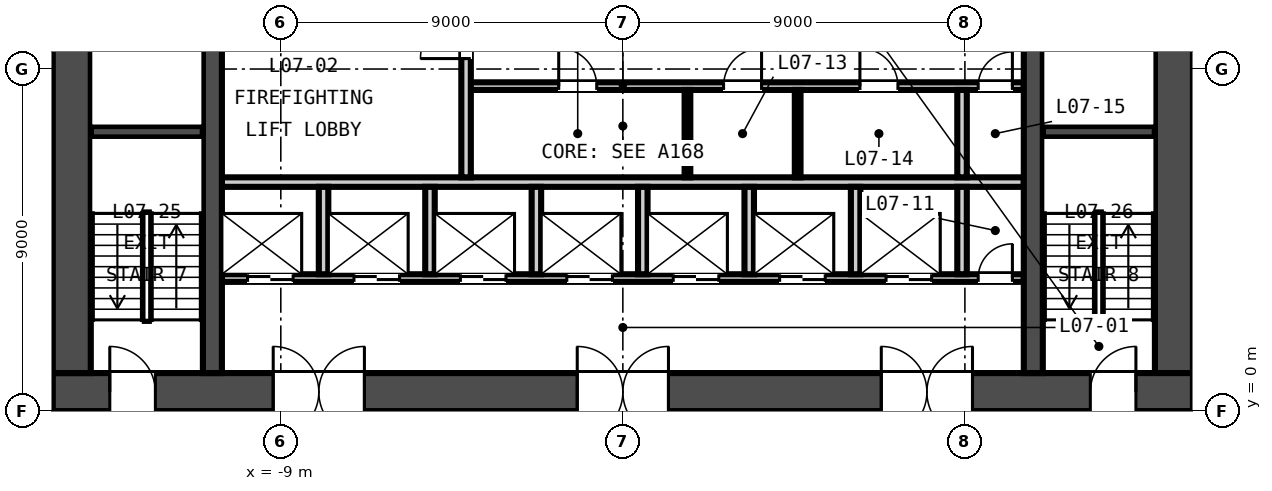
"""IFC4 building model, lengths in metres.
Left out: names, types, materials, properties, quantities, classifications, styles, units other than length and angle.
Written with IfcOpenShell. Run it as: python <this file> out.ifc"""

import sys

from ifc_helpers import new_model, si_unit, direction, frame, frame_2d, origin, place, context, subcontext, project, spatial, rectangle, extrude, element, fill, save


model = new_model("IFC4")
c1 = context("Model", 3, precision=1e-05, world=origin(), true_north=direction((0.0, 1.0)))
c2 = subcontext(c1, "Body", "Model", "MODEL_VIEW")
j1 = project(units=[si_unit("LENGTHUNIT", "METRE"), si_unit("PLANEANGLEUNIT", "RADIAN")], contexts=[c1])
p1 = place(None, origin())
s1 = spatial("IfcSite", under=j1, at=p1, CompositionType="ELEMENT")
p2 = place(p1, origin())
s2 = spatial("IfcBuilding", under=s1, at=p2, CompositionType="ELEMENT")
p3 = place(p2, frame((0.0, 0.0, 39.65)))
s3 = spatial("IfcBuildingStorey", under=s2, at=p3, CompositionType="ELEMENT", Elevation=39.65)
p4 = place(p3, frame((-15.0, 0.5, -0.15), z_axis=(0.0, 0.0, 1.0), x_axis=(1.0, 0.0, 0.0)))
e1 = element("IfcWall", 1, at=p4, inside=s3, PredefinedType="SOLIDWALL", context=c2, shape_type="SweptSolid", body=[
    extrude(rectangle(XDim=30.0, YDim=1.0, at=frame_2d((15.0, 0.0))), origin(), (0.0, 0.0, 1.0), 3.65),
])
p5 = place(p4, frame((5.8, 0.0, 0.15)))
e2 = element("IfcOpeningElement", 2, at=p5, cuts=e1, PredefinedType="OPENING", context=c2, shape_type="SweptSolid", body=[
    extrude(rectangle(XDim=2.4, YDim=2.4, at=frame_2d((1.2, 1.2))), frame((0.0, 0.51, 0.0), z_axis=(0.0, -1.0, 0.0), x_axis=(1.0, 0.0, 0.0)), (0.0, 0.0, 1.0), 1.02),
])
p6 = place(p4, frame((13.8, 0.0, 0.15)))
e3 = element("IfcOpeningElement", 3, at=p6, cuts=e1, PredefinedType="OPENING", context=c2, shape_type="SweptSolid", body=[
    extrude(rectangle(XDim=2.4, YDim=2.4, at=frame_2d((1.2, 1.2))), frame((0.0, 0.51, 0.0), z_axis=(0.0, -1.0, 0.0), x_axis=(1.0, 0.0, 0.0)), (0.0, 0.0, 1.0), 1.02),
])
p7 = place(p4, frame((21.8, 0.0, 0.15)))
e4 = element("IfcOpeningElement", 4, at=p7, cuts=e1, PredefinedType="OPENING", context=c2, shape_type="SweptSolid", body=[
    extrude(rectangle(XDim=2.4, YDim=2.4, at=frame_2d((1.2, 1.2))), frame((0.0, 0.51, 0.0), z_axis=(0.0, -1.0, 0.0), x_axis=(1.0, 0.0, 0.0)), (0.0, 0.0, 1.0), 1.02),
])
p8 = place(p4, frame((1.5, 0.0, 0.15)))
e5 = element("IfcOpeningElement", 5, at=p8, cuts=e1, PredefinedType="OPENING", context=c2, shape_type="SweptSolid", body=[
    extrude(rectangle(XDim=1.2, YDim=2.1, at=frame_2d((0.6, 1.05))), frame((0.0, 0.51, 0.0), z_axis=(0.0, -1.0, 0.0), x_axis=(1.0, 0.0, 0.0)), (0.0, 0.0, 1.0), 1.02),
])
p9 = place(p4, frame((27.3, 0.0, 0.15)))
e6 = element("IfcOpeningElement", 6, at=p9, cuts=e1, PredefinedType="OPENING", context=c2, shape_type="SweptSolid", body=[
    extrude(rectangle(XDim=1.2, YDim=2.1, at=frame_2d((0.6, 1.05))), frame((0.0, 0.51, 0.0), z_axis=(0.0, -1.0, 0.0), x_axis=(1.0, 0.0, 0.0)), (0.0, 0.0, 1.0), 1.02),
])
for number, where, z_axis, x_axis in (
    (7, (-14.5, 1.0, -0.15), (0.0, 0.0, 1.0), (0.0, 1.0, 0.0)),
    (8, (14.5, 1.0, -0.15), (0.0, 0.0, 1.0), (0.0, 1.0, 0.0)),
):
    element("IfcWall", number, at=place(p3, frame(where, z_axis=z_axis, x_axis=x_axis)), inside=s3, PredefinedType="SOLIDWALL", context=c2, shape_type="SweptSolid", body=[
        extrude(rectangle(XDim=13.0, YDim=1.0, at=frame_2d((6.5, 0.0))), origin(), (0.0, 0.0, 1.0), 3.65),
    ])
for number, where, z_axis, x_axis in (
    (9, (-10.8, 1.0, -0.15), (0.0, 0.0, 1.0), (0.0, 1.0, 0.0)),
    (10, (10.8, 1.0, -0.15), (0.0, 0.0, 1.0), (0.0, 1.0, 0.0)),
):
    element("IfcWall", number, at=place(p3, frame(where, z_axis=z_axis, x_axis=x_axis)), inside=s3, PredefinedType="SOLIDWALL", context=c2, shape_type="SweptSolid", body=[
        extrude(rectangle(XDim=13.0, YDim=0.5, at=frame_2d((6.5, 0.0))), origin(), (0.0, 0.0, 1.0), 3.65),
    ])
p10 = place(p3, frame((-10.55, 3.5, 0.0), z_axis=(0.0, 0.0, 1.0), x_axis=(1.0, 0.0, 0.0)))
e11 = element("IfcWall", 11, at=p10, inside=s3, PredefinedType="PARTITIONING", context=c2, shape_type="SweptSolid", body=[
    extrude(rectangle(XDim=21.1, YDim=0.2, at=frame_2d((10.55, 0.0))), origin(), (0.0, 0.0, 1.0), 3.5),
])
p11 = place(p10, frame((0.675, 0.0, 0.0)))
e12 = element("IfcOpeningElement", 12, at=p11, cuts=e11, PredefinedType="OPENING", context=c2, shape_type="SweptSolid", body=[
    extrude(rectangle(XDim=1.2, YDim=2.1, at=frame_2d((0.6, 1.05))), frame((0.0, 0.11, 0.0), z_axis=(0.0, -1.0, 0.0), x_axis=(1.0, 0.0, 0.0)), (0.0, 0.0, 1.0), 0.22),
])
p12 = place(p10, frame((3.475, 0.0, 0.0)))
e13 = element("IfcOpeningElement", 13, at=p12, cuts=e11, PredefinedType="OPENING", context=c2, shape_type="SweptSolid", body=[
    extrude(rectangle(XDim=1.2, YDim=2.1, at=frame_2d((0.6, 1.05))), frame((0.0, 0.11, 0.0), z_axis=(0.0, -1.0, 0.0), x_axis=(1.0, 0.0, 0.0)), (0.0, 0.0, 1.0), 0.22),
])
p13 = place(p10, frame((6.275, 0.0, 0.0)))
e14 = element("IfcOpeningElement", 14, at=p13, cuts=e11, PredefinedType="OPENING", context=c2, shape_type="SweptSolid", body=[
    extrude(rectangle(XDim=1.2, YDim=2.1, at=frame_2d((0.6, 1.05))), frame((0.0, 0.11, 0.0), z_axis=(0.0, -1.0, 0.0), x_axis=(1.0, 0.0, 0.0)), (0.0, 0.0, 1.0), 0.22),
])
p14 = place(p10, frame((9.075, 0.0, 0.0)))
e15 = element("IfcOpeningElement", 15, at=p14, cuts=e11, PredefinedType="OPENING", context=c2, shape_type="SweptSolid", body=[
    extrude(rectangle(XDim=1.2, YDim=2.1, at=frame_2d((0.6, 1.05))), frame((0.0, 0.11, 0.0), z_axis=(0.0, -1.0, 0.0), x_axis=(1.0, 0.0, 0.0)), (0.0, 0.0, 1.0), 0.22),
])
p15 = place(p10, frame((11.875, 0.0, 0.0)))
e16 = element("IfcOpeningElement", 16, at=p15, cuts=e11, PredefinedType="OPENING", context=c2, shape_type="SweptSolid", body=[
    extrude(rectangle(XDim=1.2, YDim=2.1, at=frame_2d((0.6, 1.05))), frame((0.0, 0.11, 0.0), z_axis=(0.0, -1.0, 0.0), x_axis=(1.0, 0.0, 0.0)), (0.0, 0.0, 1.0), 0.22),
])
p16 = place(p10, frame((14.675, 0.0, 0.0)))
e17 = element("IfcOpeningElement", 17, at=p16, cuts=e11, PredefinedType="OPENING", context=c2, shape_type="SweptSolid", body=[
    extrude(rectangle(XDim=1.2, YDim=2.1, at=frame_2d((0.6, 1.05))), frame((0.0, 0.11, 0.0), z_axis=(0.0, -1.0, 0.0), x_axis=(1.0, 0.0, 0.0)), (0.0, 0.0, 1.0), 0.22),
])
p17 = place(p10, frame((17.475, 0.0, 0.0)))
e18 = element("IfcOpeningElement", 18, at=p17, cuts=e11, PredefinedType="OPENING", context=c2, shape_type="SweptSolid", body=[
    extrude(rectangle(XDim=1.2, YDim=2.1, at=frame_2d((0.6, 1.05))), frame((0.0, 0.11, 0.0), z_axis=(0.0, -1.0, 0.0), x_axis=(1.0, 0.0, 0.0)), (0.0, 0.0, 1.0), 0.22),
])
p18 = place(p10, frame((19.9, 0.0, 0.0)))
e19 = element("IfcOpeningElement", 19, at=p18, cuts=e11, PredefinedType="OPENING", context=c2, shape_type="SweptSolid", body=[
    extrude(rectangle(XDim=0.9, YDim=2.1, at=frame_2d((0.45, 1.05))), frame((0.0, 0.11, 0.0), z_axis=(0.0, -1.0, 0.0), x_axis=(1.0, 0.0, 0.0)), (0.0, 0.0, 1.0), 0.22),
])
p19 = place(p3, frame((-10.55, 6.025, 0.0), z_axis=(0.0, 0.0, 1.0), x_axis=(1.0, 0.0, 0.0)))
e20 = element("IfcWall", 20, at=p19, inside=s3, PredefinedType="PARTITIONING", context=c2, shape_type="SweptSolid", body=[
    extrude(rectangle(XDim=21.1, YDim=0.25, at=frame_2d((10.55, 0.0))), origin(), (0.0, 0.0, 1.0), 3.5),
])
p20 = place(p3, frame((-4.125, 8.55, 0.0), z_axis=(0.0, 0.0, 1.0), x_axis=(1.0, 0.0, 0.0)))
e21 = element("IfcWall", 21, at=p20, inside=s3, PredefinedType="PARTITIONING", context=c2, shape_type="SweptSolid", body=[
    extrude(rectangle(XDim=14.675, YDim=0.2, at=frame_2d((7.337, 0.0))), origin(), (0.0, 0.0, 1.0), 3.5),
])
p21 = place(p20, frame((2.438, 0.0, 0.0)))
e22 = element("IfcOpeningElement", 22, at=p21, cuts=e21, PredefinedType="OPENING", context=c2, shape_type="SweptSolid", body=[
    extrude(rectangle(XDim=1.0, YDim=2.1, at=frame_2d((0.5, 1.05))), frame((0.0, 0.11, 0.0), z_axis=(0.0, -1.0, 0.0), x_axis=(1.0, 0.0, 0.0)), (0.0, 0.0, 1.0), 0.22),
])
p22 = place(p20, frame((6.775, 0.0, 0.0)))
e23 = element("IfcOpeningElement", 23, at=p22, cuts=e21, PredefinedType="OPENING", context=c2, shape_type="SweptSolid", body=[
    extrude(rectangle(XDim=1.0, YDim=2.1, at=frame_2d((0.5, 1.05))), frame((0.0, 0.11, 0.0), z_axis=(0.0, -1.0, 0.0), x_axis=(1.0, 0.0, 0.0)), (0.0, 0.0, 1.0), 0.22),
])
p23 = place(p20, frame((10.363, 0.0, 0.0)))
e24 = element("IfcOpeningElement", 24, at=p23, cuts=e21, PredefinedType="OPENING", context=c2, shape_type="SweptSolid", body=[
    extrude(rectangle(XDim=1.0, YDim=2.1, at=frame_2d((0.5, 1.05))), frame((0.0, 0.11, 0.0), z_axis=(0.0, -1.0, 0.0), x_axis=(1.0, 0.0, 0.0)), (0.0, 0.0, 1.0), 0.22),
])
p24 = place(p20, frame((13.475, 0.0, 0.0)))
e25 = element("IfcOpeningElement", 25, at=p24, cuts=e21, PredefinedType="OPENING", context=c2, shape_type="SweptSolid", body=[
    extrude(rectangle(XDim=0.9, YDim=2.1, at=frame_2d((0.45, 1.05))), frame((0.0, 0.11, 0.0), z_axis=(0.0, -1.0, 0.0), x_axis=(1.0, 0.0, 0.0)), (0.0, 0.0, 1.0), 0.22),
])
p25 = place(p3, frame((-4.125, 6.15, 0.0), z_axis=(0.0, 0.0, 1.0), x_axis=(0.0, 1.0, 0.0)))
e26 = element("IfcWall", 26, at=p25, inside=s3, PredefinedType="PARTITIONING", context=c2, shape_type="SweptSolid", body=[
    extrude(rectangle(XDim=4.95, YDim=0.25, at=frame_2d((2.475, 0.0))), origin(), (0.0, 0.0, 1.0), 3.5),
])
p26 = place(p25, frame((3.125, 0.0, 0.0)))
e27 = element("IfcOpeningElement", 27, at=p26, cuts=e26, PredefinedType="OPENING", context=c2, shape_type="SweptSolid", body=[
    extrude(rectangle(XDim=1.2, YDim=2.1, at=frame_2d((0.6, 1.05))), frame((0.0, 0.135, 0.0), z_axis=(0.0, -1.0, 0.0), x_axis=(1.0, 0.0, 0.0)), (0.0, 0.0, 1.0), 0.27),
])
for number, where, z_axis, x_axis in (
    (28, (-7.875, 3.6, 0.0), (0.0, 0.0, 1.0), (0.0, 1.0, 0.0)),
    (29, (-5.075, 3.6, 0.0), (0.0, 0.0, 1.0), (0.0, 1.0, 0.0)),
    (30, (-2.275, 3.6, 0.0), (0.0, 0.0, 1.0), (0.0, 1.0, 0.0)),
    (31, (0.525, 3.6, 0.0), (0.0, 0.0, 1.0), (0.0, 1.0, 0.0)),
    (32, (3.325, 3.6, 0.0), (0.0, 0.0, 1.0), (0.0, 1.0, 0.0)),
    (33, (6.125, 3.6, 0.0), (0.0, 0.0, 1.0), (0.0, 1.0, 0.0)),
    (34, (8.925, 3.6, 0.0), (0.0, 0.0, 1.0), (0.0, 1.0, 0.0)),
):
    element("IfcWall", number, at=place(p3, frame(where, z_axis=z_axis, x_axis=x_axis)), inside=s3, PredefinedType="PARTITIONING", context=c2, shape_type="SweptSolid", body=[
        extrude(rectangle(XDim=2.3, YDim=0.25, at=frame_2d((1.15, 0.0))), origin(), (0.0, 0.0, 1.0), 3.5),
    ])
for number, where, z_axis, x_axis in (
    (35, (1.7, 6.15, 0.0), (0.0, 0.0, 1.0), (0.0, 1.0, 0.0)),
    (36, (4.6, 6.15, 0.0), (0.0, 0.0, 1.0), (0.0, 1.0, 0.0)),
):
    element("IfcWall", number, at=place(p3, frame(where, z_axis=z_axis, x_axis=x_axis)), inside=s3, PredefinedType="PARTITIONING", context=c2, shape_type="SweptSolid", body=[
        extrude(rectangle(XDim=2.3, YDim=0.15, at=frame_2d((1.15, 0.0))), origin(), (0.0, 0.0, 1.0), 3.5),
    ])
p27 = place(p3, frame((8.925, 6.15, 0.0), z_axis=(0.0, 0.0, 1.0), x_axis=(0.0, 1.0, 0.0)))
e37 = element("IfcWall", 37, at=p27, inside=s3, PredefinedType="PARTITIONING", context=c2, shape_type="SweptSolid", body=[
    extrude(rectangle(XDim=2.3, YDim=0.25, at=frame_2d((1.15, 0.0))), origin(), (0.0, 0.0, 1.0), 3.5),
])
for number, where, z_axis, x_axis in (
    (38, (-14.0, 7.35, -0.15), (0.0, 0.0, 1.0), (1.0, 0.0, 0.0)),
    (39, (11.05, 7.35, -0.15), (0.0, 0.0, 1.0), (1.0, 0.0, 0.0)),
):
    element("IfcWall", number, at=place(p3, frame(where, z_axis=z_axis, x_axis=x_axis)), inside=s3, PredefinedType="SOLIDWALL", context=c2, shape_type="SweptSolid", body=[
        extrude(rectangle(XDim=2.95, YDim=0.3, at=frame_2d((1.475, 0.0))), origin(), (0.0, 0.0, 1.0), 3.65),
    ])
p28 = place(p26, origin())
e40 = element("IfcDoor", 40, at=p28, inside=s3, OperationType="SINGLE_SWING_LEFT", PredefinedType="DOOR", context=c2, shape_type="SweptSolid", body=[
    extrude(rectangle(XDim=1.2, YDim=2.1, at=frame_2d((0.6, 1.05))), frame((0.0, 0.025, 0.0), z_axis=(0.0, -1.0, 0.0), x_axis=(1.0, 0.0, 0.0)), (0.0, 0.0, 1.0), 0.05),
])
fill(e27, e40)
p29 = place(p11, origin())
e41 = element("IfcDoor", 41, at=p29, inside=s3, OperationType="DOUBLE_DOOR_SLIDING", PredefinedType="DOOR", context=c2, shape_type="SweptSolid", body=[
    extrude(rectangle(XDim=1.2, YDim=2.1, at=frame_2d((0.6, 1.05))), frame((0.0, 0.025, 0.0), z_axis=(0.0, -1.0, 0.0), x_axis=(1.0, 0.0, 0.0)), (0.0, 0.0, 1.0), 0.05),
])
fill(e12, e41)
p30 = place(p12, origin())
e42 = element("IfcDoor", 42, at=p30, inside=s3, OperationType="DOUBLE_DOOR_SLIDING", PredefinedType="DOOR", context=c2, shape_type="SweptSolid", body=[
    extrude(rectangle(XDim=1.2, YDim=2.1, at=frame_2d((0.6, 1.05))), frame((0.0, 0.025, 0.0), z_axis=(0.0, -1.0, 0.0), x_axis=(1.0, 0.0, 0.0)), (0.0, 0.0, 1.0), 0.05),
])
fill(e13, e42)
p31 = place(p13, origin())
e43 = element("IfcDoor", 43, at=p31, inside=s3, OperationType="DOUBLE_DOOR_SLIDING", PredefinedType="DOOR", context=c2, shape_type="SweptSolid", body=[
    extrude(rectangle(XDim=1.2, YDim=2.1, at=frame_2d((0.6, 1.05))), frame((0.0, 0.025, 0.0), z_axis=(0.0, -1.0, 0.0), x_axis=(1.0, 0.0, 0.0)), (0.0, 0.0, 1.0), 0.05),
])
fill(e14, e43)
p32 = place(p14, origin())
e44 = element("IfcDoor", 44, at=p32, inside=s3, OperationType="DOUBLE_DOOR_SLIDING", PredefinedType="DOOR", context=c2, shape_type="SweptSolid", body=[
    extrude(rectangle(XDim=1.2, YDim=2.1, at=frame_2d((0.6, 1.05))), frame((0.0, 0.025, 0.0), z_axis=(0.0, -1.0, 0.0), x_axis=(1.0, 0.0, 0.0)), (0.0, 0.0, 1.0), 0.05),
])
fill(e15, e44)
p33 = place(p15, origin())
e45 = element("IfcDoor", 45, at=p33, inside=s3, OperationType="DOUBLE_DOOR_SLIDING", PredefinedType="DOOR", context=c2, shape_type="SweptSolid", body=[
    extrude(rectangle(XDim=1.2, YDim=2.1, at=frame_2d((0.6, 1.05))), frame((0.0, 0.025, 0.0), z_axis=(0.0, -1.0, 0.0), x_axis=(1.0, 0.0, 0.0)), (0.0, 0.0, 1.0), 0.05),
])
fill(e16, e45)
p34 = place(p16, origin())
e46 = element("IfcDoor", 46, at=p34, inside=s3, OperationType="DOUBLE_DOOR_SLIDING", PredefinedType="DOOR", context=c2, shape_type="SweptSolid", body=[
    extrude(rectangle(XDim=1.2, YDim=2.1, at=frame_2d((0.6, 1.05))), frame((0.0, 0.025, 0.0), z_axis=(0.0, -1.0, 0.0), x_axis=(1.0, 0.0, 0.0)), (0.0, 0.0, 1.0), 0.05),
])
fill(e17, e46)
p35 = place(p17, origin())
e47 = element("IfcDoor", 47, at=p35, inside=s3, OperationType="DOUBLE_DOOR_SLIDING", PredefinedType="DOOR", context=c2, shape_type="SweptSolid", body=[
    extrude(rectangle(XDim=1.2, YDim=2.1, at=frame_2d((0.6, 1.05))), frame((0.0, 0.025, 0.0), z_axis=(0.0, -1.0, 0.0), x_axis=(1.0, 0.0, 0.0)), (0.0, 0.0, 1.0), 0.05),
])
fill(e18, e47)
p36 = place(p18, origin())
e48 = element("IfcDoor", 48, at=p36, inside=s3, OperationType="SINGLE_SWING_RIGHT", PredefinedType="DOOR", context=c2, shape_type="SweptSolid", body=[
    extrude(rectangle(XDim=0.9, YDim=2.1, at=frame_2d((0.45, 1.05))), frame((0.0, 0.025, 0.0), z_axis=(0.0, -1.0, 0.0), x_axis=(1.0, 0.0, 0.0)), (0.0, 0.0, 1.0), 0.05),
])
fill(e19, e48)
p37 = place(p21, origin())
e49 = element("IfcDoor", 49, at=p37, inside=s3, OperationType="SINGLE_SWING_LEFT", PredefinedType="DOOR", context=c2, shape_type="SweptSolid", body=[
    extrude(rectangle(XDim=1.0, YDim=2.1, at=frame_2d((0.5, 1.05))), frame((0.0, 0.025, 0.0), z_axis=(0.0, -1.0, 0.0), x_axis=(1.0, 0.0, 0.0)), (0.0, 0.0, 1.0), 0.05),
])
fill(e22, e49)
p38 = place(p22, origin())
e50 = element("IfcDoor", 50, at=p38, inside=s3, OperationType="SINGLE_SWING_RIGHT", PredefinedType="DOOR", context=c2, shape_type="SweptSolid", body=[
    extrude(rectangle(XDim=1.0, YDim=2.1, at=frame_2d((0.5, 1.05))), frame((0.0, 0.025, 0.0), z_axis=(0.0, -1.0, 0.0), x_axis=(1.0, 0.0, 0.0)), (0.0, 0.0, 1.0), 0.05),
])
fill(e23, e50)
p39 = place(p23, origin())
e51 = element("IfcDoor", 51, at=p39, inside=s3, OperationType="SINGLE_SWING_LEFT", PredefinedType="DOOR", context=c2, shape_type="SweptSolid", body=[
    extrude(rectangle(XDim=1.0, YDim=2.1, at=frame_2d((0.5, 1.05))), frame((0.0, 0.025, 0.0), z_axis=(0.0, -1.0, 0.0), x_axis=(1.0, 0.0, 0.0)), (0.0, 0.0, 1.0), 0.05),
])
fill(e24, e51)
p40 = place(p24, origin())
e52 = element("IfcDoor", 52, at=p40, inside=s3, OperationType="SINGLE_SWING_RIGHT", PredefinedType="DOOR", context=c2, shape_type="SweptSolid", body=[
    extrude(rectangle(XDim=0.9, YDim=2.1, at=frame_2d((0.45, 1.05))), frame((0.0, 0.025, 0.0), z_axis=(0.0, -1.0, 0.0), x_axis=(1.0, 0.0, 0.0)), (0.0, 0.0, 1.0), 0.05),
])
fill(e25, e52)
p41 = place(p5, origin())
e53 = element("IfcDoor", 53, at=p41, inside=s3, OperationType="DOUBLE_DOOR_DOUBLE_SWING", PredefinedType="DOOR", context=c2, shape_type="SweptSolid", body=[
    extrude(rectangle(XDim=2.4, YDim=2.4, at=frame_2d((1.2, 1.2))), frame((0.0, 0.025, 0.0), z_axis=(0.0, -1.0, 0.0), x_axis=(1.0, 0.0, 0.0)), (0.0, 0.0, 1.0), 0.05),
])
fill(e2, e53)
p42 = place(p6, origin())
e54 = element("IfcDoor", 54, at=p42, inside=s3, OperationType="DOUBLE_DOOR_DOUBLE_SWING", PredefinedType="DOOR", context=c2, shape_type="SweptSolid", body=[
    extrude(rectangle(XDim=2.4, YDim=2.4, at=frame_2d((1.2, 1.2))), frame((0.0, 0.025, 0.0), z_axis=(0.0, -1.0, 0.0), x_axis=(1.0, 0.0, 0.0)), (0.0, 0.0, 1.0), 0.05),
])
fill(e3, e54)
p43 = place(p7, origin())
e55 = element("IfcDoor", 55, at=p43, inside=s3, OperationType="DOUBLE_DOOR_DOUBLE_SWING", PredefinedType="DOOR", context=c2, shape_type="SweptSolid", body=[
    extrude(rectangle(XDim=2.4, YDim=2.4, at=frame_2d((1.2, 1.2))), frame((0.0, 0.025, 0.0), z_axis=(0.0, -1.0, 0.0), x_axis=(1.0, 0.0, 0.0)), (0.0, 0.0, 1.0), 0.05),
])
fill(e4, e55)
p44 = place(p8, origin())
e56 = element("IfcDoor", 56, at=p44, inside=s3, OperationType="SINGLE_SWING_LEFT", PredefinedType="DOOR", context=c2, shape_type="SweptSolid", body=[
    extrude(rectangle(XDim=1.2, YDim=2.1, at=frame_2d((0.6, 1.05))), frame((0.0, 0.025, 0.0), z_axis=(0.0, -1.0, 0.0), x_axis=(1.0, 0.0, 0.0)), (0.0, 0.0, 1.0), 0.05),
])
fill(e5, e56)
p45 = place(p9, origin())
e57 = element("IfcDoor", 57, at=p45, inside=s3, OperationType="SINGLE_SWING_RIGHT", PredefinedType="DOOR", context=c2, shape_type="SweptSolid", body=[
    extrude(rectangle(XDim=1.2, YDim=2.1, at=frame_2d((0.6, 1.05))), frame((0.0, 0.025, 0.0), z_axis=(0.0, -1.0, 0.0), x_axis=(1.0, 0.0, 0.0)), (0.0, 0.0, 1.0), 0.05),
])
fill(e6, e57)
save(model, sys.argv[1])
